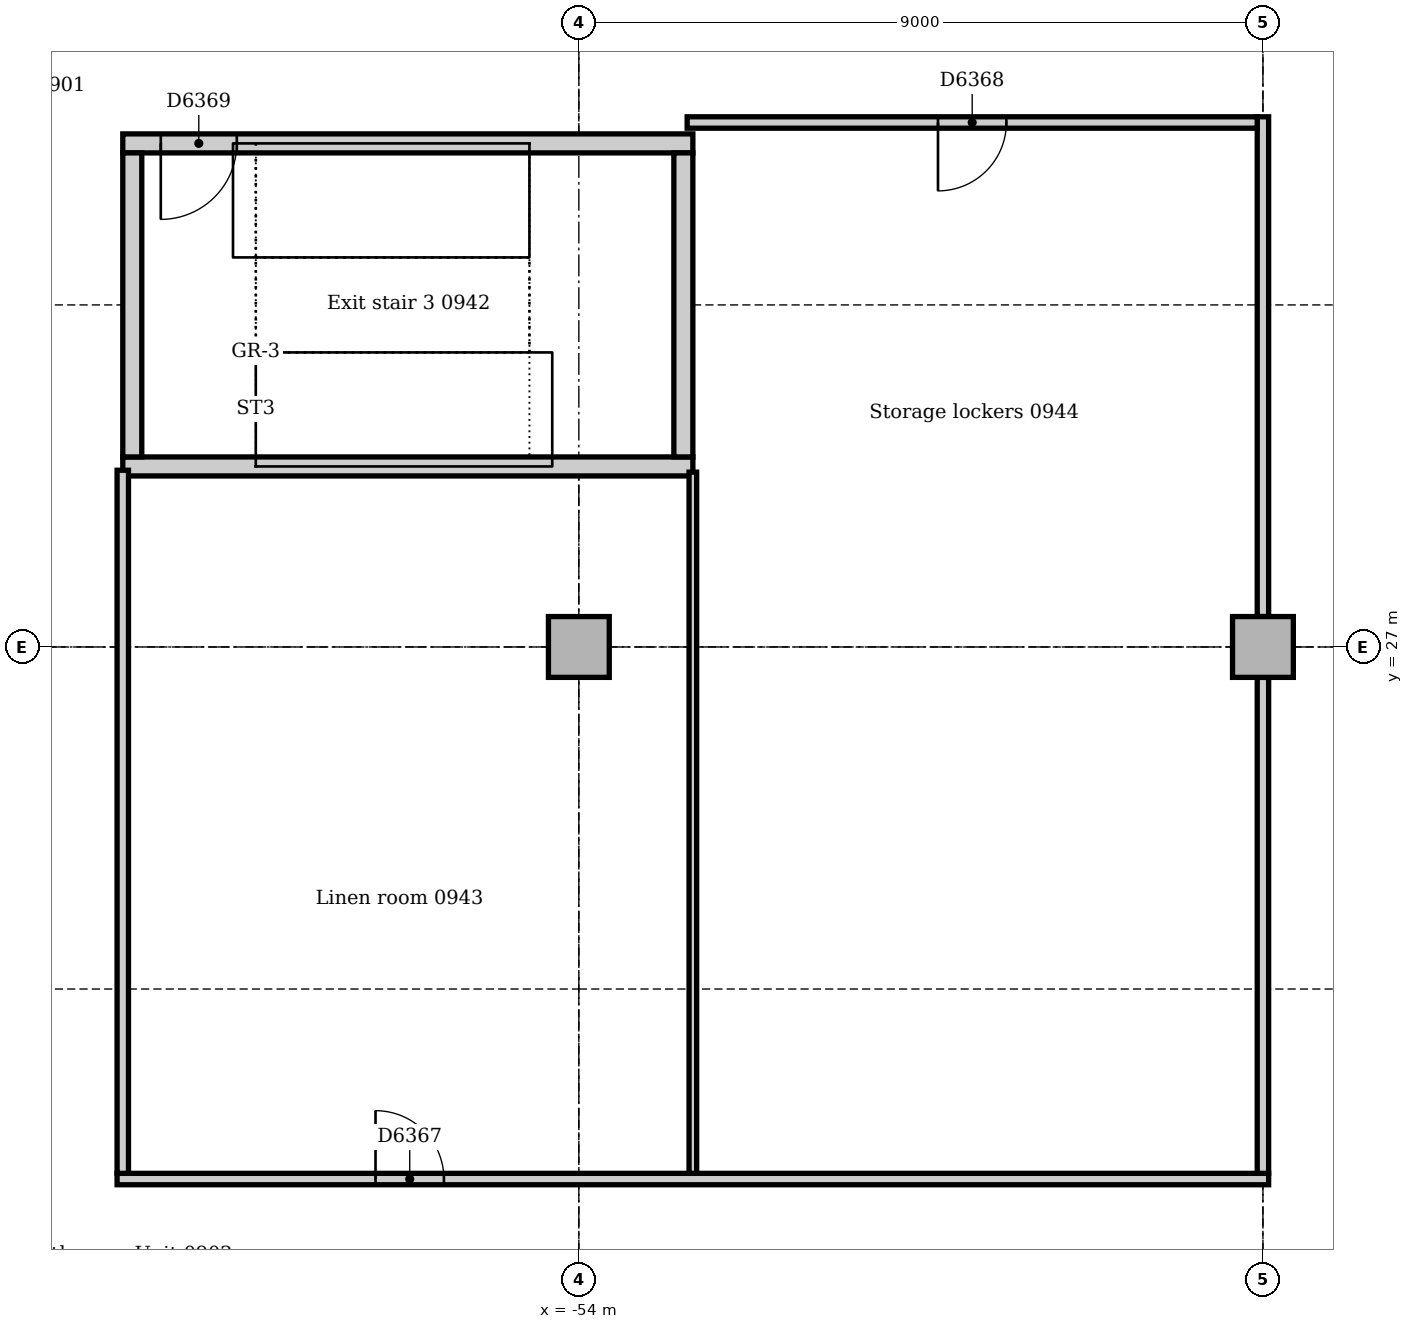
"""IFC4 building model, lengths in metres.
Left out: names, types, materials, properties, quantities, classifications, styles, units other than length and angle.
Written with IfcOpenShell. Run it as: python <this file> out.ifc"""

import sys

from ifc_helpers import new_model, si_unit, direction, frame, frame_2d, origin, origin_2d, place, context, subcontext, project, spatial, rectangle, extrude, element, fill, save


model = new_model("IFC4")
c1 = context("Model", 3, precision=1e-05, world=origin(), true_north=direction((0.0, 1.0)))
c2 = subcontext(c1, "Body", "Model", "MODEL_VIEW")
j1 = project(units=[si_unit("LENGTHUNIT", "METRE"), si_unit("PLANEANGLEUNIT", "RADIAN")], contexts=[c1])
p1 = place(None, origin())
s1 = spatial("IfcSite", under=j1, at=p1, CompositionType="ELEMENT")
p2 = place(p1, origin())
s2 = spatial("IfcBuilding", under=s1, at=p2, CompositionType="ELEMENT")
p3 = place(p2, frame((0.0, 0.0, 42.0)))
s3 = spatial("IfcBuildingStorey", under=s2, at=p3, CompositionType="ELEMENT", Elevation=42.0)
p4 = place(p3, frame((-60.0, 29.375, 0.0), z_axis=(0.0, 0.0, 1.0), x_axis=(1.0, 0.0, 0.0)))
e1 = element("IfcWall", 1, at=p4, inside=s3, PredefinedType="SOLIDWALL", context=c2, shape_type="SweptSolid", body=[
    extrude(rectangle(XDim=7.5, YDim=0.25, at=frame_2d((3.75, 0.0))), origin(), (0.0, 0.0, 1.0), 4.0),
])
p5 = place(p3, frame((-52.5, 33.625, 0.0), z_axis=(0.0, 0.0, 1.0), x_axis=(-1.0, 0.0, 0.0)))
e2 = element("IfcWall", 2, at=p5, inside=s3, PredefinedType="SOLIDWALL", context=c2, shape_type="SweptSolid", body=[
    extrude(rectangle(XDim=7.5, YDim=0.25, at=frame_2d((3.75, 0.0))), origin(), (0.0, 0.0, 1.0), 4.0),
])
p6 = place(p5, frame((6.0, 0.0, 0.0)))
e3 = element("IfcOpeningElement", 3, at=p6, cuts=e2, PredefinedType="OPENING", context=c2, shape_type="SweptSolid", body=[
    extrude(rectangle(XDim=1.0, YDim=2.1, at=frame_2d((0.5, 1.05))), frame((0.0, 0.135, 0.0), z_axis=(0.0, -1.0, 0.0), x_axis=(1.0, 0.0, 0.0)), (0.0, 0.0, 1.0), 0.27),
])
for number, where, z_axis, x_axis in (
    (4, (-52.625, 29.5, 0.0), (0.0, 0.0, 1.0), (0.0, 1.0, 0.0)),
    (5, (-59.875, 33.5, 0.0), (0.0, 0.0, 1.0), (0.0, -1.0, 0.0)),
):
    element("IfcWall", number, at=place(p3, frame(where, z_axis=z_axis, x_axis=x_axis)), inside=s3, PredefinedType="SOLIDWALL", context=c2, shape_type="SweptSolid", body=[
        extrude(rectangle(XDim=4.0, YDim=0.25, at=frame_2d((2.0, 0.0))), origin(), (0.0, 0.0, 1.0), 4.0),
    ])
for number, where, z_axis, x_axis in (
    (6, (-54.0, 27.0, 0.0), (0.0, 0.0, 1.0), (1.0, 0.0, 0.0)),
    (7, (-45.0, 27.0, 0.0), (0.0, 0.0, 1.0), (1.0, 0.0, 0.0)),
):
    element("IfcColumn", number, at=place(p3, frame(where, z_axis=z_axis, x_axis=x_axis)), inside=s3, PredefinedType="COLUMN", context=c2, shape_type="SweptSolid", body=[
        extrude(rectangle(XDim=0.8, YDim=0.8, at=origin_2d()), origin(), (0.0, 0.0, 1.0), 3.7),
    ])
p7 = place(p3, frame((-60.075, 20.0, 0.0), z_axis=(0.0, 0.0, 1.0), x_axis=(1.0, 0.0, 0.0)))
e8 = element("IfcWall", 8, at=p7, inside=s3, PredefinedType="PARTITIONING", context=c2, shape_type="SweptSolid", body=[
    extrude(rectangle(XDim=15.15, YDim=0.15, at=frame_2d((7.575, 0.0))), origin(), (0.0, 0.0, 1.0), 3.7),
])
p8 = place(p7, frame((3.4, 0.0, 0.0)))
e9 = element("IfcOpeningElement", 9, at=p8, cuts=e8, PredefinedType="OPENING", context=c2, shape_type="SweptSolid", body=[
    extrude(rectangle(XDim=0.9, YDim=2.1, at=frame_2d((0.45, 1.05))), frame((0.0, 0.085, 0.0), z_axis=(0.0, -1.0, 0.0), x_axis=(1.0, 0.0, 0.0)), (0.0, 0.0, 1.0), 0.17),
])
p9 = place(p3, frame((-45.0, 20.075, 0.0), z_axis=(0.0, 0.0, 1.0), x_axis=(0.0, 1.0, 0.0)))
e10 = element("IfcWall", 10, at=p9, inside=s3, PredefinedType="PARTITIONING", context=c2, shape_type="SweptSolid", body=[
    extrude(rectangle(XDim=6.525, YDim=0.15, at=frame_2d((3.263, 0.0))), origin(), (0.0, 0.0, 1.0), 3.008),
])
p10 = place(p3, frame((-45.0, 27.4, 0.0), z_axis=(0.0, 0.0, 1.0), x_axis=(0.0, 1.0, 0.0)))
e11 = element("IfcWall", 11, at=p10, inside=s3, PredefinedType="PARTITIONING", context=c2, shape_type="SweptSolid", body=[
    extrude(rectangle(XDim=6.575, YDim=0.15, at=frame_2d((3.288, 0.0))), origin(), (0.0, 0.0, 1.0), 3.008),
])
p11 = place(p3, frame((-60.0, 20.075, 0.0), z_axis=(0.0, 0.0, 1.0), x_axis=(0.0, 1.0, 0.0)))
e12 = element("IfcWall", 12, at=p11, inside=s3, PredefinedType="PARTITIONING", context=c2, shape_type="SweptSolid", body=[
    extrude(rectangle(XDim=9.25, YDim=0.15, at=frame_2d((4.625, 0.0))), origin(), (0.0, 0.0, 1.0), 3.7),
])
p12 = place(p3, frame((-52.575, 33.9, 0.0), z_axis=(0.0, 0.0, 1.0), x_axis=(1.0, 0.0, 0.0)))
e13 = element("IfcWall", 13, at=p12, inside=s3, PredefinedType="PARTITIONING", context=c2, shape_type="SweptSolid", body=[
    extrude(rectangle(XDim=7.5, YDim=0.15, at=frame_2d((3.75, 0.0))), origin(), (0.0, 0.0, 1.0), 3.7),
])
p13 = place(p12, frame((3.3, 0.0, 0.0)))
e14 = element("IfcOpeningElement", 14, at=p13, cuts=e13, PredefinedType="OPENING", context=c2, shape_type="SweptSolid", body=[
    extrude(rectangle(XDim=0.9, YDim=2.1, at=frame_2d((0.45, 1.05))), frame((0.0, 0.085, 0.0), z_axis=(0.0, -1.0, 0.0), x_axis=(1.0, 0.0, 0.0)), (0.0, 0.0, 1.0), 0.17),
])
p14 = place(p3, frame((-52.5, 20.075, 0.0), z_axis=(0.0, 0.0, 1.0), x_axis=(0.0, 1.0, 0.0)))
e15 = element("IfcWall", 15, at=p14, inside=s3, PredefinedType="PARTITIONING", context=c2, shape_type="SweptSolid", body=[
    extrude(rectangle(XDim=9.225, YDim=0.1, at=frame_2d((4.612, 0.0))), origin(), (0.0, 0.0, 1.0), 3.7),
])
p15 = place(p8, origin())
e16 = element("IfcDoor", 16, at=p15, inside=s3, OperationType="SINGLE_SWING_LEFT", PredefinedType="DOOR", context=c2, shape_type="SweptSolid", body=[
    extrude(rectangle(XDim=0.9, YDim=2.1, at=frame_2d((0.45, 1.05))), frame((0.0, 0.025, 0.0), z_axis=(0.0, -1.0, 0.0), x_axis=(1.0, 0.0, 0.0)), (0.0, 0.0, 1.0), 0.05),
])
fill(e9, e16)
p16 = place(p13, frame((0.9, 0.0, 0.0), z_axis=(0.0, 0.0, 1.0), x_axis=(-1.0, 0.0, 0.0)))
e17 = element("IfcDoor", 17, at=p16, inside=s3, OperationType="SINGLE_SWING_RIGHT", PredefinedType="DOOR", context=c2, shape_type="SweptSolid", body=[
    extrude(rectangle(XDim=0.9, YDim=2.1, at=frame_2d((0.45, 1.05))), frame((0.0, 0.025, 0.0), z_axis=(0.0, -1.0, 0.0), x_axis=(1.0, 0.0, 0.0)), (0.0, 0.0, 1.0), 0.05),
])
fill(e14, e17)
p17 = place(p6, origin())
e18 = element("IfcDoor", 18, at=p17, inside=s3, OperationType="SINGLE_SWING_RIGHT", PredefinedType="DOOR", context=c2, shape_type="SweptSolid", body=[
    extrude(rectangle(XDim=1.0, YDim=2.1, at=frame_2d((0.5, 1.05))), frame((0.0, 0.025, 0.0), z_axis=(0.0, -1.0, 0.0), x_axis=(1.0, 0.0, 0.0)), (0.0, 0.0, 1.0), 0.05),
])
fill(e3, e18)
save(model, sys.argv[1])
